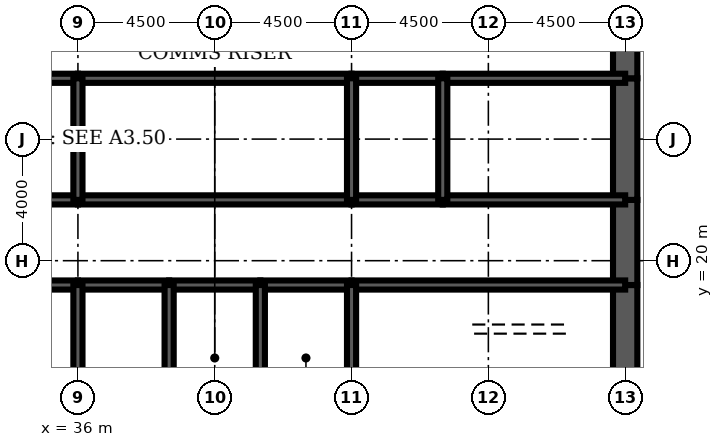
"""IFC4 building model, lengths in metres.
Left out: names, types, materials, properties, quantities, classifications, styles, units other than length and angle.
Written with IfcOpenShell. Run it as: python <this file> out.ifc"""

import sys

from ifc_helpers import new_model, si_unit, direction, frame, frame_2d, origin, place, context, subcontext, project, spatial, rectangle, extrude, element, fill, save


model = new_model("IFC4")
c1 = context("Model", 3, precision=1e-05, world=origin(), true_north=direction((0.0, 1.0)))
c2 = subcontext(c1, "Body", "Model", "MODEL_VIEW")
j1 = project(units=[si_unit("LENGTHUNIT", "METRE"), si_unit("PLANEANGLEUNIT", "RADIAN")], contexts=[c1])
p1 = place(None, origin())
s1 = spatial("IfcSite", under=j1, at=p1, CompositionType="ELEMENT")
p2 = place(p1, origin())
s2 = spatial("IfcBuilding", under=s1, at=p2, CompositionType="ELEMENT")
p3 = place(p2, frame((0.0, 0.0, 215.2)))
s3 = spatial("IfcBuildingStorey", under=s2, at=p3, CompositionType="ELEMENT", Elevation=215.2)
p4 = place(p3, frame((54.0, 16.0, 0.0), z_axis=(0.0, 0.0, 1.0), x_axis=(0.0, 1.0, 0.0)))
e1 = element("IfcWall", 1, at=p4, inside=s3, PredefinedType="SHEAR", context=c2, shape_type="SweptSolid", body=[
    extrude(rectangle(XDim=3.2, YDim=0.8, at=frame_2d((1.6, 0.0))), origin(), (0.0, 0.0, 1.0), 4.2),
])
p5 = place(p3, frame((54.0, 19.2, 0.0), z_axis=(0.0, 0.0, 1.0), x_axis=(0.0, 1.0, 0.0)))
e2 = element("IfcWall", 2, at=p5, inside=s3, PredefinedType="SHEAR", context=c2, shape_type="SweptSolid", body=[
    extrude(rectangle(XDim=2.8, YDim=0.8, at=frame_2d((1.4, 0.0))), origin(), (0.0, 0.0, 1.0), 4.2),
])
p6 = place(p5, frame((0.4, 0.0, 0.0)))
e3 = element("IfcOpeningElement", 3, at=p6, cuts=e2, PredefinedType="OPENING", context=c2, shape_type="SweptSolid", body=[
    extrude(rectangle(XDim=1.8, YDim=2.1, at=frame_2d((0.9, 1.05))), frame((0.0, 0.41, 0.0), z_axis=(0.0, -1.0, 0.0), x_axis=(1.0, 0.0, 0.0)), (0.0, 0.0, 1.0), 0.82),
])
p7 = place(p3, frame((54.0, 22.0, 0.0), z_axis=(0.0, 0.0, 1.0), x_axis=(0.0, 1.0, 0.0)))
e4 = element("IfcWall", 4, at=p7, inside=s3, PredefinedType="SHEAR", context=c2, shape_type="SweptSolid", body=[
    extrude(rectangle(XDim=4.0, YDim=0.8, at=frame_2d((2.0, 0.0))), origin(), (0.0, 0.0, 1.0), 4.2),
])
p8 = place(p3, frame((54.0, 26.0, 0.0), z_axis=(0.0, 0.0, 1.0), x_axis=(0.0, 1.0, 0.0)))
e5 = element("IfcWall", 5, at=p8, inside=s3, PredefinedType="SHEAR", context=c2, shape_type="SweptSolid", body=[
    extrude(rectangle(XDim=2.8, YDim=0.8, at=frame_2d((1.4, 0.0))), origin(), (0.0, 0.0, 1.0), 4.2),
])
p9 = place(p8, frame((0.6, 0.0, 0.0)))
e6 = element("IfcOpeningElement", 6, at=p9, cuts=e5, PredefinedType="OPENING", context=c2, shape_type="SweptSolid", body=[
    extrude(rectangle(XDim=1.8, YDim=2.1, at=frame_2d((0.9, 1.05))), frame((0.0, 0.41, 0.0), z_axis=(0.0, -1.0, 0.0), x_axis=(1.0, 0.0, 0.0)), (0.0, 0.0, 1.0), 0.82),
])
p10 = place(p3, frame((33.0, 19.2, 0.0), z_axis=(0.0, 0.0, 1.0), x_axis=(1.0, 0.0, 0.0)))
e7 = element("IfcWall", 7, at=p10, inside=s3, PredefinedType="SOLIDWALL", context=c2, shape_type="SweptSolid", body=[
    extrude(rectangle(XDim=3.0, YDim=0.3, at=frame_2d((1.5, 0.0))), origin(), (0.0, 0.0, 1.0), 4.2),
])
p11 = place(p10, frame((0.95, 0.0, 0.0)))
e8 = element("IfcOpeningElement", 8, at=p11, cuts=e7, PredefinedType="OPENING", context=c2, shape_type="SweptSolid", body=[
    extrude(rectangle(XDim=1.1, YDim=2.2, at=frame_2d((0.55, 1.1))), frame((0.0, 0.16, 0.0), z_axis=(0.0, -1.0, 0.0), x_axis=(1.0, 0.0, 0.0)), (0.0, 0.0, 1.0), 0.32),
])
p12 = place(p3, frame((36.0, 19.2, 0.0), z_axis=(0.0, 0.0, 1.0), x_axis=(1.0, 0.0, 0.0)))
e9 = element("IfcWall", 9, at=p12, inside=s3, PredefinedType="SOLIDWALL", context=c2, shape_type="SweptSolid", body=[
    extrude(rectangle(XDim=3.0, YDim=0.3, at=frame_2d((1.5, 0.0))), origin(), (0.0, 0.0, 1.0), 4.2),
])
p13 = place(p12, frame((0.95, 0.0, 0.0)))
e10 = element("IfcOpeningElement", 10, at=p13, cuts=e9, PredefinedType="OPENING", context=c2, shape_type="SweptSolid", body=[
    extrude(rectangle(XDim=1.1, YDim=2.2, at=frame_2d((0.55, 1.1))), frame((0.0, 0.16, 0.0), z_axis=(0.0, -1.0, 0.0), x_axis=(1.0, 0.0, 0.0)), (0.0, 0.0, 1.0), 0.32),
])
p14 = place(p3, frame((39.0, 19.2, 0.0), z_axis=(0.0, 0.0, 1.0), x_axis=(1.0, 0.0, 0.0)))
e11 = element("IfcWall", 11, at=p14, inside=s3, PredefinedType="SOLIDWALL", context=c2, shape_type="SweptSolid", body=[
    extrude(rectangle(XDim=3.0, YDim=0.3, at=frame_2d((1.5, 0.0))), origin(), (0.0, 0.0, 1.0), 4.2),
])
p15 = place(p14, frame((1.0, 0.0, 0.0)))
e12 = element("IfcOpeningElement", 12, at=p15, cuts=e11, PredefinedType="OPENING", context=c2, shape_type="SweptSolid", body=[
    extrude(rectangle(XDim=1.0, YDim=2.1, at=frame_2d((0.5, 1.05))), frame((0.0, 0.16, 0.0), z_axis=(0.0, -1.0, 0.0), x_axis=(1.0, 0.0, 0.0)), (0.0, 0.0, 1.0), 0.32),
])
p16 = place(p3, frame((42.0, 19.2, 0.0), z_axis=(0.0, 0.0, 1.0), x_axis=(1.0, 0.0, 0.0)))
e13 = element("IfcWall", 13, at=p16, inside=s3, PredefinedType="SOLIDWALL", context=c2, shape_type="SweptSolid", body=[
    extrude(rectangle(XDim=3.0, YDim=0.3, at=frame_2d((1.5, 0.0))), origin(), (0.0, 0.0, 1.0), 4.2),
])
p17 = place(p16, frame((1.0, 0.0, 0.0)))
e14 = element("IfcOpeningElement", 14, at=p17, cuts=e13, PredefinedType="OPENING", context=c2, shape_type="SweptSolid", body=[
    extrude(rectangle(XDim=1.0, YDim=2.1, at=frame_2d((0.5, 1.05))), frame((0.0, 0.16, 0.0), z_axis=(0.0, -1.0, 0.0), x_axis=(1.0, 0.0, 0.0)), (0.0, 0.0, 1.0), 0.32),
])
p18 = place(p3, frame((45.0, 19.2, 0.0), z_axis=(0.0, 0.0, 1.0), x_axis=(1.0, 0.0, 0.0)))
e15 = element("IfcWall", 15, at=p18, inside=s3, PredefinedType="SOLIDWALL", context=c2, shape_type="SweptSolid", body=[
    extrude(rectangle(XDim=9.0, YDim=0.3, at=frame_2d((4.5, 0.0))), origin(), (0.0, 0.0, 1.0), 4.2),
])
p19 = place(p18, frame((7.35, 0.0, 0.0)))
e16 = element("IfcOpeningElement", 16, at=p19, cuts=e15, PredefinedType="OPENING", context=c2, shape_type="SweptSolid", body=[
    extrude(rectangle(XDim=1.0, YDim=2.1, at=frame_2d((0.5, 1.05))), frame((0.0, 0.16, 0.0), z_axis=(0.0, -1.0, 0.0), x_axis=(1.0, 0.0, 0.0)), (0.0, 0.0, 1.0), 0.32),
])
p20 = place(p3, frame((27.0, 22.0, 0.0), z_axis=(0.0, 0.0, 1.0), x_axis=(1.0, 0.0, 0.0)))
e17 = element("IfcWall", 17, at=p20, inside=s3, PredefinedType="SOLIDWALL", context=c2, shape_type="SweptSolid", body=[
    extrude(rectangle(XDim=9.0, YDim=0.3, at=frame_2d((4.5, 0.0))), origin(), (0.0, 0.0, 1.0), 4.2),
])
p21 = place(p20, frame((4.0, 0.0, 0.0)))
e18 = element("IfcOpeningElement", 18, at=p21, cuts=e17, PredefinedType="OPENING", context=c2, shape_type="SweptSolid", body=[
    extrude(rectangle(XDim=1.0, YDim=2.1, at=frame_2d((0.5, 1.05))), frame((0.0, 0.16, 0.0), z_axis=(0.0, -1.0, 0.0), x_axis=(1.0, 0.0, 0.0)), (0.0, 0.0, 1.0), 0.32),
])
p22 = place(p3, frame((36.0, 22.0, 0.0), z_axis=(0.0, 0.0, 1.0), x_axis=(1.0, 0.0, 0.0)))
e19 = element("IfcWall", 19, at=p22, inside=s3, PredefinedType="SOLIDWALL", context=c2, shape_type="SweptSolid", body=[
    extrude(rectangle(XDim=9.0, YDim=0.3, at=frame_2d((4.5, 0.0))), origin(), (0.0, 0.0, 1.0), 4.2),
])
p23 = place(p22, frame((4.0, 0.0, 0.0)))
e20 = element("IfcOpeningElement", 20, at=p23, cuts=e19, PredefinedType="OPENING", context=c2, shape_type="SweptSolid", body=[
    extrude(rectangle(XDim=1.0, YDim=2.1, at=frame_2d((0.5, 1.05))), frame((0.0, 0.16, 0.0), z_axis=(0.0, -1.0, 0.0), x_axis=(1.0, 0.0, 0.0)), (0.0, 0.0, 1.0), 0.32),
])
p24 = place(p3, frame((45.0, 22.0, 0.0), z_axis=(0.0, 0.0, 1.0), x_axis=(1.0, 0.0, 0.0)))
e21 = element("IfcWall", 21, at=p24, inside=s3, PredefinedType="SOLIDWALL", context=c2, shape_type="SweptSolid", body=[
    extrude(rectangle(XDim=3.0, YDim=0.3, at=frame_2d((1.5, 0.0))), origin(), (0.0, 0.0, 1.0), 4.2),
])
p25 = place(p24, frame((1.0, 0.0, 0.0)))
e22 = element("IfcOpeningElement", 22, at=p25, cuts=e21, PredefinedType="OPENING", context=c2, shape_type="SweptSolid", body=[
    extrude(rectangle(XDim=1.0, YDim=2.1, at=frame_2d((0.5, 1.05))), frame((0.0, 0.16, 0.0), z_axis=(0.0, -1.0, 0.0), x_axis=(1.0, 0.0, 0.0)), (0.0, 0.0, 1.0), 0.32),
])
p26 = place(p3, frame((48.0, 22.0, 0.0), z_axis=(0.0, 0.0, 1.0), x_axis=(1.0, 0.0, 0.0)))
e23 = element("IfcWall", 23, at=p26, inside=s3, PredefinedType="SOLIDWALL", context=c2, shape_type="SweptSolid", body=[
    extrude(rectangle(XDim=6.0, YDim=0.3, at=frame_2d((3.0, 0.0))), origin(), (0.0, 0.0, 1.0), 4.2),
])
p27 = place(p26, frame((2.0, 0.0, 0.0)))
e24 = element("IfcOpeningElement", 24, at=p27, cuts=e23, PredefinedType="OPENING", context=c2, shape_type="SweptSolid", body=[
    extrude(rectangle(XDim=1.0, YDim=2.1, at=frame_2d((0.5, 1.05))), frame((0.0, 0.16, 0.0), z_axis=(0.0, -1.0, 0.0), x_axis=(1.0, 0.0, 0.0)), (0.0, 0.0, 1.0), 0.32),
])
p28 = place(p26, frame((4.05, 0.0, 0.0)))
e25 = element("IfcOpeningElement", 25, at=p28, cuts=e23, PredefinedType="OPENING", context=c2, shape_type="SweptSolid", body=[
    extrude(rectangle(XDim=1.0, YDim=2.1, at=frame_2d((0.5, 1.05))), frame((0.0, 0.16, 0.0), z_axis=(0.0, -1.0, 0.0), x_axis=(1.0, 0.0, 0.0)), (0.0, 0.0, 1.0), 0.32),
])
for number, where, z_axis, x_axis in (
    (26, (27.0, 26.0, 0.0), (0.0, 0.0, 1.0), (1.0, 0.0, 0.0)),
    (27, (36.0, 26.0, 0.0), (0.0, 0.0, 1.0), (1.0, 0.0, 0.0)),
):
    element("IfcWall", number, at=place(p3, frame(where, z_axis=z_axis, x_axis=x_axis)), inside=s3, PredefinedType="SOLIDWALL", context=c2, shape_type="SweptSolid", body=[
        extrude(rectangle(XDim=9.0, YDim=0.3, at=frame_2d((4.5, 0.0))), origin(), (0.0, 0.0, 1.0), 4.2),
    ])
p29 = place(p3, frame((45.0, 26.0, 0.0), z_axis=(0.0, 0.0, 1.0), x_axis=(1.0, 0.0, 0.0)))
e28 = element("IfcWall", 28, at=p29, inside=s3, PredefinedType="SOLIDWALL", context=c2, shape_type="SweptSolid", body=[
    extrude(rectangle(XDim=3.0, YDim=0.3, at=frame_2d((1.5, 0.0))), origin(), (0.0, 0.0, 1.0), 4.2),
])
p30 = place(p3, frame((48.0, 26.0, 0.0), z_axis=(0.0, 0.0, 1.0), x_axis=(1.0, 0.0, 0.0)))
e29 = element("IfcWall", 29, at=p30, inside=s3, PredefinedType="SOLIDWALL", context=c2, shape_type="SweptSolid", body=[
    extrude(rectangle(XDim=6.0, YDim=0.3, at=frame_2d((3.0, 0.0))), origin(), (0.0, 0.0, 1.0), 4.2),
])
for number, where, z_axis, x_axis in (
    (30, (36.0, 16.0, 0.0), (0.0, 0.0, 1.0), (0.0, 1.0, 0.0)),
    (31, (39.0, 16.0, 0.0), (0.0, 0.0, 1.0), (0.0, 1.0, 0.0)),
    (32, (42.0, 16.0, 0.0), (0.0, 0.0, 1.0), (0.0, 1.0, 0.0)),
    (33, (45.0, 16.0, 0.0), (0.0, 0.0, 1.0), (0.0, 1.0, 0.0)),
):
    element("IfcWall", number, at=place(p3, frame(where, z_axis=z_axis, x_axis=x_axis)), inside=s3, PredefinedType="SOLIDWALL", context=c2, shape_type="SweptSolid", body=[
        extrude(rectangle(XDim=3.2, YDim=0.3, at=frame_2d((1.6, 0.0))), origin(), (0.0, 0.0, 1.0), 4.2),
    ])
for number, where, z_axis, x_axis in (
    (34, (36.0, 22.0, 0.0), (0.0, 0.0, 1.0), (0.0, 1.0, 0.0)),
    (35, (45.0, 22.0, 0.0), (0.0, 0.0, 1.0), (0.0, 1.0, 0.0)),
    (36, (48.0, 22.0, 0.0), (0.0, 0.0, 1.0), (0.0, 1.0, 0.0)),
):
    element("IfcWall", number, at=place(p3, frame(where, z_axis=z_axis, x_axis=x_axis)), inside=s3, PredefinedType="SOLIDWALL", context=c2, shape_type="SweptSolid", body=[
        extrude(rectangle(XDim=4.0, YDim=0.3, at=frame_2d((2.0, 0.0))), origin(), (0.0, 0.0, 1.0), 4.2),
    ])
p31 = place(p3, frame((39.15, 17.35, 0.0), z_axis=(0.0, 0.0, 1.0), x_axis=(1.0, 0.0, 0.0)))
e37 = element("IfcWall", 37, at=p31, inside=s3, PredefinedType="SOLIDWALL", context=c2, shape_type="SweptSolid", body=[
    extrude(rectangle(XDim=2.7, YDim=0.3, at=frame_2d((1.35, 0.0))), origin(), (0.0, 0.0, 1.0), 4.04),
])
p32 = place(p31, frame((0.85, 0.0, 0.0)))
e38 = element("IfcOpeningElement", 38, at=p32, cuts=e37, PredefinedType="OPENING", context=c2, shape_type="SweptSolid", body=[
    extrude(rectangle(XDim=1.0, YDim=2.1, at=frame_2d((0.5, 1.05))), frame((0.0, 0.16, 0.0), z_axis=(0.0, -1.0, 0.0), x_axis=(1.0, 0.0, 0.0)), (0.0, 0.0, 1.0), 0.32),
])
p33 = place(p3, frame((42.15, 17.35, 0.0), z_axis=(0.0, 0.0, 1.0), x_axis=(1.0, 0.0, 0.0)))
e39 = element("IfcWall", 39, at=p33, inside=s3, PredefinedType="SOLIDWALL", context=c2, shape_type="SweptSolid", body=[
    extrude(rectangle(XDim=2.7, YDim=0.3, at=frame_2d((1.35, 0.0))), origin(), (0.0, 0.0, 1.0), 4.04),
])
p34 = place(p33, frame((0.85, 0.0, 0.0)))
e40 = element("IfcOpeningElement", 40, at=p34, cuts=e39, PredefinedType="OPENING", context=c2, shape_type="SweptSolid", body=[
    extrude(rectangle(XDim=1.0, YDim=2.1, at=frame_2d((0.5, 1.05))), frame((0.0, 0.16, 0.0), z_axis=(0.0, -1.0, 0.0), x_axis=(1.0, 0.0, 0.0)), (0.0, 0.0, 1.0), 0.32),
])
p35 = place(p3, frame((39.0, 22.15, 0.0), z_axis=(0.0, 0.0, 1.0), x_axis=(0.0, 1.0, 0.0)))
e41 = element("IfcWall", 41, at=p35, inside=s3, PredefinedType="PARTITIONING", context=c2, shape_type="SweptSolid", body=[
    extrude(rectangle(XDim=3.7, YDim=0.15, at=frame_2d((1.85, 0.0))), origin(), (0.0, 0.0, 1.0), 3.0),
])
p36 = place(p35, frame((2.2, 0.0, 0.0)))
e42 = element("IfcOpeningElement", 42, at=p36, cuts=e41, PredefinedType="OPENING", context=c2, shape_type="SweptSolid", body=[
    extrude(rectangle(XDim=1.0, YDim=2.1, at=frame_2d((0.5, 1.05))), frame((0.0, 0.085, 0.0), z_axis=(0.0, -1.0, 0.0), x_axis=(1.0, 0.0, 0.0)), (0.0, 0.0, 1.0), 0.17),
])
p37 = place(p3, frame((51.425, 22.15, 0.0), z_axis=(0.0, 0.0, 1.0), x_axis=(0.0, 1.0, 0.0)))
e43 = element("IfcWall", 43, at=p37, inside=s3, PredefinedType="PARTITIONING", context=c2, shape_type="SweptSolid", body=[
    extrude(rectangle(XDim=3.7, YDim=0.15, at=frame_2d((1.85, 0.0))), origin(), (0.0, 0.0, 1.0), 3.0),
])
p38 = place(p3, frame((47.7, 19.35, 0.0), z_axis=(0.0, 0.0, 1.0), x_axis=(0.0, 1.0, 0.0)))
e44 = element("IfcWall", 44, at=p38, inside=s3, PredefinedType="PARTITIONING", context=c2, shape_type="SweptSolid", body=[
    extrude(rectangle(XDim=2.5, YDim=0.15, at=frame_2d((1.25, 0.0))), origin(), (0.0, 0.0, 1.0), 3.0),
])
p39 = place(p38, frame((1.15, 0.0, 0.0)))
e45 = element("IfcOpeningElement", 45, at=p39, cuts=e44, PredefinedType="OPENING", context=c2, shape_type="SweptSolid", body=[
    extrude(rectangle(XDim=1.0, YDim=2.1, at=frame_2d((0.5, 1.05))), frame((0.0, 0.085, 0.0), z_axis=(0.0, -1.0, 0.0), x_axis=(1.0, 0.0, 0.0)), (0.0, 0.0, 1.0), 0.17),
])
p40 = place(p32, origin())
e46 = element("IfcDoor", 46, at=p40, inside=s3, OperationType="SINGLE_SWING_LEFT", PredefinedType="DOOR", context=c2, shape_type="SweptSolid", body=[
    extrude(rectangle(XDim=1.0, YDim=2.1, at=frame_2d((0.5, 1.05))), frame((0.0, 0.025, 0.0), z_axis=(0.0, -1.0, 0.0), x_axis=(1.0, 0.0, 0.0)), (0.0, 0.0, 1.0), 0.05),
])
fill(e38, e46)
p41 = place(p34, origin())
e47 = element("IfcDoor", 47, at=p41, inside=s3, OperationType="SINGLE_SWING_LEFT", PredefinedType="DOOR", context=c2, shape_type="SweptSolid", body=[
    extrude(rectangle(XDim=1.0, YDim=2.1, at=frame_2d((0.5, 1.05))), frame((0.0, 0.025, 0.0), z_axis=(0.0, -1.0, 0.0), x_axis=(1.0, 0.0, 0.0)), (0.0, 0.0, 1.0), 0.05),
])
fill(e40, e47)
p42 = place(p36, origin())
e48 = element("IfcDoor", 48, at=p42, inside=s3, OperationType="SINGLE_SWING_RIGHT", PredefinedType="DOOR", context=c2, shape_type="SweptSolid", body=[
    extrude(rectangle(XDim=1.0, YDim=2.1, at=frame_2d((0.5, 1.05))), frame((0.0, 0.025, 0.0), z_axis=(0.0, -1.0, 0.0), x_axis=(1.0, 0.0, 0.0)), (0.0, 0.0, 1.0), 0.05),
])
fill(e42, e48)
p43 = place(p39, origin())
e49 = element("IfcDoor", 49, at=p43, inside=s3, OperationType="SINGLE_SWING_RIGHT", PredefinedType="DOOR", context=c2, shape_type="SweptSolid", body=[
    extrude(rectangle(XDim=1.0, YDim=2.1, at=frame_2d((0.5, 1.05))), frame((0.0, 0.025, 0.0), z_axis=(0.0, -1.0, 0.0), x_axis=(1.0, 0.0, 0.0)), (0.0, 0.0, 1.0), 0.05),
])
fill(e45, e49)
p44 = place(p13, origin())
e50 = element("IfcDoor", 50, at=p44, inside=s3, OperationType="DOUBLE_DOOR_SLIDING", PredefinedType="USERDEFINED", context=c2, shape_type="SweptSolid", body=[
    extrude(rectangle(XDim=1.1, YDim=2.2, at=frame_2d((0.55, 1.1))), frame((0.0, 0.025, 0.0), z_axis=(0.0, -1.0, 0.0), x_axis=(1.0, 0.0, 0.0)), (0.0, 0.0, 1.0), 0.05),
])
fill(e10, e50)
p45 = place(p19, origin())
e51 = element("IfcDoor", 51, at=p45, inside=s3, OperationType="SINGLE_SWING_RIGHT", PredefinedType="DOOR", context=c2, shape_type="SweptSolid", body=[
    extrude(rectangle(XDim=1.0, YDim=2.1, at=frame_2d((0.5, 1.05))), frame((0.0, 0.025, 0.0), z_axis=(0.0, -1.0, 0.0), x_axis=(1.0, 0.0, 0.0)), (0.0, 0.0, 1.0), 0.05),
])
fill(e16, e51)
p46 = place(p6, origin())
e52 = element("IfcDoor", 52, at=p46, inside=s3, OperationType="SINGLE_SWING_LEFT", PredefinedType="DOOR", context=c2, shape_type="SweptSolid", body=[
    extrude(rectangle(XDim=1.8, YDim=2.1, at=frame_2d((0.9, 1.05))), frame((0.0, 0.4, 0.0), z_axis=(0.0, -1.0, 0.0), x_axis=(1.0, 0.0, 0.0)), (0.0, 0.0, 1.0), 0.8),
])
fill(e3, e52)
p47 = place(p9, origin())
e53 = element("IfcDoor", 53, at=p47, inside=s3, OperationType="SINGLE_SWING_LEFT", PredefinedType="DOOR", context=c2, shape_type="SweptSolid", body=[
    extrude(rectangle(XDim=1.8, YDim=2.1, at=frame_2d((0.9, 1.05))), frame((0.0, 0.4, 0.0), z_axis=(0.0, -1.0, 0.0), x_axis=(1.0, 0.0, 0.0)), (0.0, 0.0, 1.0), 0.8),
])
fill(e6, e53)
p48 = place(p23, origin())
e54 = element("IfcDoor", 54, at=p48, inside=s3, OperationType="SINGLE_SWING_LEFT", PredefinedType="DOOR", context=c2, shape_type="SweptSolid", body=[
    extrude(rectangle(XDim=1.0, YDim=2.1, at=frame_2d((0.5, 1.05))), frame((0.0, 0.025, 0.0), z_axis=(0.0, -1.0, 0.0), x_axis=(1.0, 0.0, 0.0)), (0.0, 0.0, 1.0), 0.05),
])
fill(e20, e54)
p49 = place(p25, origin())
e55 = element("IfcDoor", 55, at=p49, inside=s3, OperationType="SINGLE_SWING_LEFT", PredefinedType="DOOR", context=c2, shape_type="SweptSolid", body=[
    extrude(rectangle(XDim=1.0, YDim=2.1, at=frame_2d((0.5, 1.05))), frame((0.0, 0.025, 0.0), z_axis=(0.0, -1.0, 0.0), x_axis=(1.0, 0.0, 0.0)), (0.0, 0.0, 1.0), 0.05),
])
fill(e22, e55)
p50 = place(p27, origin())
e56 = element("IfcDoor", 56, at=p50, inside=s3, OperationType="SINGLE_SWING_LEFT", PredefinedType="DOOR", context=c2, shape_type="SweptSolid", body=[
    extrude(rectangle(XDim=1.0, YDim=2.1, at=frame_2d((0.5, 1.05))), frame((0.0, 0.025, 0.0), z_axis=(0.0, -1.0, 0.0), x_axis=(1.0, 0.0, 0.0)), (0.0, 0.0, 1.0), 0.05),
])
fill(e24, e56)
p51 = place(p28, origin())
e57 = element("IfcDoor", 57, at=p51, inside=s3, OperationType="SINGLE_SWING_RIGHT", PredefinedType="DOOR", context=c2, shape_type="SweptSolid", body=[
    extrude(rectangle(XDim=1.0, YDim=2.1, at=frame_2d((0.5, 1.05))), frame((0.0, 0.025, 0.0), z_axis=(0.0, -1.0, 0.0), x_axis=(1.0, 0.0, 0.0)), (0.0, 0.0, 1.0), 0.05),
])
fill(e25, e57)
p52 = place(p15, origin())
e58 = element("IfcDoor", 58, at=p52, inside=s3, OperationType="SINGLE_SWING_LEFT", PredefinedType="DOOR", context=c2, shape_type="SweptSolid", body=[
    extrude(rectangle(XDim=1.0, YDim=2.1, at=frame_2d((0.5, 1.05))), frame((0.0, 0.025, 0.0), z_axis=(0.0, -1.0, 0.0), x_axis=(1.0, 0.0, 0.0)), (0.0, 0.0, 1.0), 0.05),
])
fill(e12, e58)
p53 = place(p17, origin())
e59 = element("IfcDoor", 59, at=p53, inside=s3, OperationType="SINGLE_SWING_LEFT", PredefinedType="DOOR", context=c2, shape_type="SweptSolid", body=[
    extrude(rectangle(XDim=1.0, YDim=2.1, at=frame_2d((0.5, 1.05))), frame((0.0, 0.025, 0.0), z_axis=(0.0, -1.0, 0.0), x_axis=(1.0, 0.0, 0.0)), (0.0, 0.0, 1.0), 0.05),
])
fill(e14, e59)
save(model, sys.argv[1])
